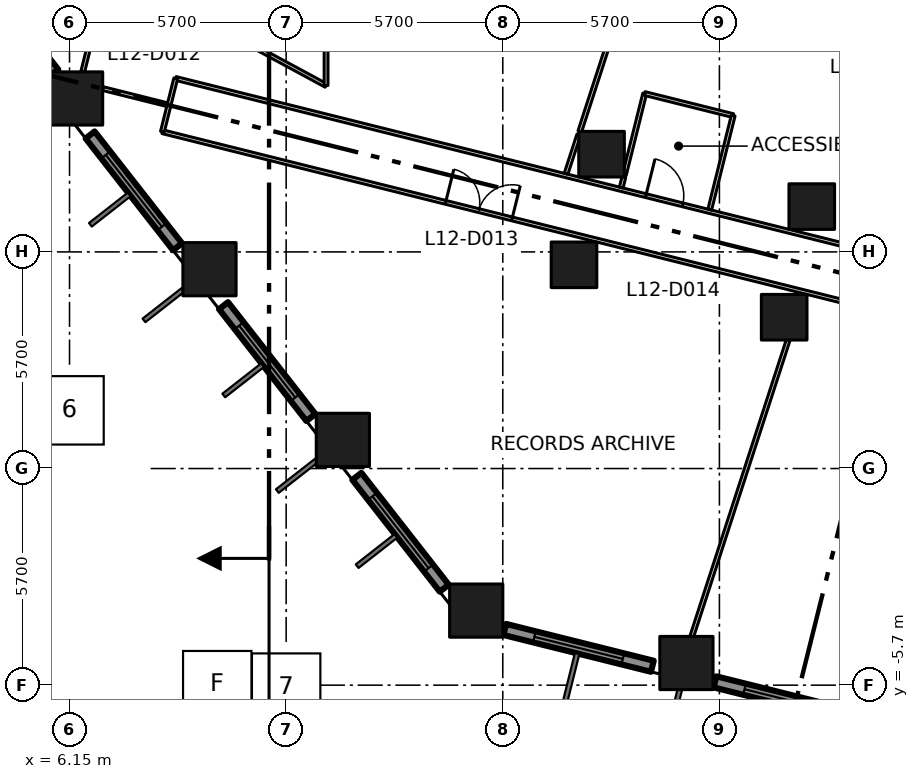
"""IFC4 building model, lengths in metres.
Left out: names, types, materials, properties, quantities, classifications, styles, units other than length and angle.
Written with IfcOpenShell. Run it as: python <this file> out.ifc"""

import sys

from ifc_helpers import new_model, si_unit, direction, frame, frame_2d, origin, origin_2d, place, context, subcontext, project, spatial, rectangle, extrude, element, fill, save


model = new_model("IFC4")
c1 = context("Model", 3, precision=1e-05, world=origin(), true_north=direction((0.0, 1.0)))
c2 = subcontext(c1, "Body", "Model", "MODEL_VIEW")
j1 = project(units=[si_unit("LENGTHUNIT", "METRE"), si_unit("PLANEANGLEUNIT", "RADIAN")], contexts=[c1])
p1 = place(None, origin())
s1 = spatial("IfcSite", under=j1, at=p1, CompositionType="ELEMENT")
p2 = place(p1, origin())
s2 = spatial("IfcBuilding", under=s1, at=p2, CompositionType="ELEMENT")
p3 = place(p2, frame((0.0, 0.0, 58.2)))
s3 = spatial("IfcBuildingStorey", under=s2, at=p3, CompositionType="ELEMENT", Elevation=58.2)
for number, where, z_axis, x_axis in (
    (1, (16.851, -3.738, 0.0), (0.0, 0.0, 1.0), (1.0, 0.0, 0.0)),
    (2, (13.342, 0.754, 0.0), (0.0, 0.0, 1.0), (1.0, 0.0, 0.0)),
    (3, (9.833, 5.245, 0.0), (0.0, 0.0, 1.0), (1.0, 0.0, 0.0)),
    (4, (6.323, 9.737, 0.0), (0.0, 0.0, 1.0), (1.0, 0.0, 0.0)),
    (5, (22.382, -5.117, 0.0), (0.0, 0.0, 1.0), (1.0, 0.0, 0.0)),
):
    element("IfcColumn", number, at=place(p3, frame(where, z_axis=z_axis, x_axis=x_axis)), inside=s3, PredefinedType="COLUMN", context=c2, shape_type="SweptSolid", body=[
        extrude(rectangle(XDim=1.4, YDim=1.4, at=origin_2d()), origin(), (0.0, 0.0, 1.0), 4.2),
    ])
for number, where, z_axis, x_axis in (
    (6, (19.424, 5.36, 0.0), (0.0, 0.0, 1.0), (1.0, 0.0, 0.0)),
    (7, (24.954, 3.981, 0.0), (0.0, 0.0, 1.0), (1.0, 0.0, 0.0)),
    (8, (20.149, 8.271, 0.0), (0.0, 0.0, 1.0), (1.0, 0.0, 0.0)),
    (9, (25.68, 6.892, 0.0), (0.0, 0.0, 1.0), (1.0, 0.0, 0.0)),
):
    element("IfcColumn", number, at=place(p3, frame(where, z_axis=z_axis, x_axis=x_axis)), inside=s3, PredefinedType="COLUMN", context=c2, shape_type="SweptSolid", body=[
        extrude(rectangle(XDim=1.2, YDim=1.2, at=origin_2d()), origin(), (0.0, 0.0, 1.0), 4.2),
    ])
p4 = place(p3, frame((3.361, 13.529, 0.0), z_axis=(0.0, 0.0, 1.0), x_axis=(0.615507574125, -0.788130970204, 0.0)))
e10 = element("IfcWall", 10, at=p4, inside=s3, PredefinedType="SOLIDWALL", context=c2, shape_type="SweptSolid", body=[
    extrude(rectangle(XDim=3.923, YDim=0.2, at=frame_2d((1.962, 0.0))), origin(), (0.0, 0.0, 1.0), 3.1),
])
p5 = place(p4, frame((1.061, 0.0, 0.0)))
e11 = element("IfcOpeningElement", 11, at=p5, cuts=e10, PredefinedType="OPENING", context=c2, shape_type="SweptSolid", body=[
    extrude(rectangle(XDim=1.8, YDim=2.9, at=frame_2d((0.9, 1.45))), frame((0.0, 0.11, 0.0), z_axis=(0.0, -1.0, 0.0), x_axis=(1.0, 0.0, 0.0)), (0.0, 0.0, 1.0), 0.22),
])
p6 = place(p3, frame((6.692, 8.778, 0.0), z_axis=(0.0, 0.0, 1.0), x_axis=(0.615767067156, -0.787928244833, 0.0)))
e12 = element("IfcWall", 12, at=p6, inside=s3, PredefinedType="SOLIDWALL", context=c2, shape_type="SweptSolid", body=[
    extrude(rectangle(XDim=3.735, YDim=0.3, at=frame_2d((1.868, 0.0))), origin(), (0.0, 0.0, 1.0), 3.1),
])
p7 = place(p6, frame((0.668, 0.0, 0.8)))
e13 = element("IfcOpeningElement", 13, at=p7, cuts=e12, PredefinedType="OPENING", context=c2, shape_type="SweptSolid", body=[
    extrude(rectangle(XDim=2.4, YDim=2.1, at=frame_2d((1.2, 1.05))), frame((0.0, 0.16, 0.0), z_axis=(0.0, -1.0, 0.0), x_axis=(1.0, 0.0, 0.0)), (0.0, 0.0, 1.0), 0.32),
])
p8 = place(p3, frame((10.202, 4.286, 0.0), z_axis=(0.0, 0.0, 1.0), x_axis=(0.615636430057, -0.788030320474, 0.0)))
e14 = element("IfcWall", 14, at=p8, inside=s3, PredefinedType="SOLIDWALL", context=c2, shape_type="SweptSolid", body=[
    extrude(rectangle(XDim=3.734, YDim=0.3, at=frame_2d((1.867, 0.0))), origin(), (0.0, 0.0, 1.0), 3.1),
])
p9 = place(p8, frame((0.667, 0.0, 0.8)))
e15 = element("IfcOpeningElement", 15, at=p9, cuts=e14, PredefinedType="OPENING", context=c2, shape_type="SweptSolid", body=[
    extrude(rectangle(XDim=2.4, YDim=2.1, at=frame_2d((1.2, 1.05))), frame((0.0, 0.16, 0.0), z_axis=(0.0, -1.0, 0.0), x_axis=(1.0, 0.0, 0.0)), (0.0, 0.0, 1.0), 0.32),
])
p10 = place(p3, frame((13.71, -0.205, 0.0), z_axis=(0.0, 0.0, 1.0), x_axis=(0.615798780214, -0.787903460004, 0.0)))
e16 = element("IfcWall", 16, at=p10, inside=s3, PredefinedType="SOLIDWALL", context=c2, shape_type="SweptSolid", body=[
    extrude(rectangle(XDim=3.735, YDim=0.3, at=frame_2d((1.868, 0.0))), origin(), (0.0, 0.0, 1.0), 3.1),
])
p11 = place(p10, frame((0.667, 0.0, 0.8)))
e17 = element("IfcOpeningElement", 17, at=p11, cuts=e16, PredefinedType="OPENING", context=c2, shape_type="SweptSolid", body=[
    extrude(rectangle(XDim=2.4, YDim=2.1, at=frame_2d((1.2, 1.05))), frame((0.0, 0.16, 0.0), z_axis=(0.0, -1.0, 0.0), x_axis=(1.0, 0.0, 0.0)), (0.0, 0.0, 1.0), 0.32),
])
p12 = place(p3, frame((17.602, -4.234, 0.0), z_axis=(0.0, 0.0, 1.0), x_axis=(0.970260773365, -0.242062040951, 0.0)))
e18 = element("IfcWall", 18, at=p12, inside=s3, PredefinedType="SOLIDWALL", context=c2, shape_type="SweptSolid", body=[
    extrude(rectangle(XDim=4.003, YDim=0.3, at=frame_2d((2.001, 0.0))), origin(), (0.0, 0.0, 1.0), 3.1),
])
p13 = place(p12, frame((0.802, 0.0, 0.8)))
e19 = element("IfcOpeningElement", 19, at=p13, cuts=e18, PredefinedType="OPENING", context=c2, shape_type="SweptSolid", body=[
    extrude(rectangle(XDim=2.4, YDim=2.1, at=frame_2d((1.2, 1.05))), frame((0.0, 0.16, 0.0), z_axis=(0.0, -1.0, 0.0), x_axis=(1.0, 0.0, 0.0)), (0.0, 0.0, 1.0), 0.32),
])
p14 = place(p3, frame((23.133, -5.613, 0.0), z_axis=(0.0, 0.0, 1.0), x_axis=(0.970303772127, -0.241889623168, 0.0)))
e20 = element("IfcWall", 20, at=p14, inside=s3, PredefinedType="SOLIDWALL", context=c2, shape_type="SweptSolid", body=[
    extrude(rectangle(XDim=4.002, YDim=0.3, at=frame_2d((2.001, 0.0))), origin(), (0.0, 0.0, 1.0), 3.1),
])
p15 = place(p14, frame((0.801, 0.0, 0.8)))
e21 = element("IfcOpeningElement", 21, at=p15, cuts=e20, PredefinedType="OPENING", context=c2, shape_type="SweptSolid", body=[
    extrude(rectangle(XDim=2.4, YDim=2.1, at=frame_2d((1.2, 1.05))), frame((0.0, 0.16, 0.0), z_axis=(0.0, -1.0, 0.0), x_axis=(1.0, 0.0, 0.0)), (0.0, 0.0, 1.0), 0.32),
])
p16 = place(p3, frame((8.594, 8.862, 0.0), z_axis=(0.0, 0.0, 1.0), x_axis=(0.970293392615, -0.241931255211, 0.0)))
e22 = element("IfcWall", 22, at=p16, inside=s3, PredefinedType="PARTITIONING", context=c2, shape_type="SweptSolid", body=[
    extrude(rectangle(XDim=67.775, YDim=0.1, at=frame_2d((33.888, 0.0))), origin(), (0.0, 0.0, 1.0), 3.9),
])
p17 = place(p16, frame((41.271, 0.0, 0.0)))
e23 = element("IfcOpeningElement", 23, at=p17, cuts=e22, PredefinedType="OPENING", context=c2, shape_type="SweptSolid", body=[
    extrude(rectangle(XDim=1.8, YDim=2.1, at=frame_2d((0.9, 1.05))), frame((0.0, 0.06, 0.0), z_axis=(0.0, -1.0, 0.0), x_axis=(1.0, 0.0, 0.0)), (0.0, 0.0, 1.0), 0.12),
])
p18 = place(p16, frame((48.571, 0.0, 0.0)))
e24 = element("IfcOpeningElement", 24, at=p18, cuts=e22, PredefinedType="OPENING", context=c2, shape_type="SweptSolid", body=[
    extrude(rectangle(XDim=1.0, YDim=2.1, at=frame_2d((0.5, 1.05))), frame((0.0, 0.06, 0.0), z_axis=(0.0, -1.0, 0.0), x_axis=(1.0, 0.0, 0.0)), (0.0, 0.0, 1.0), 0.12),
])
p19 = place(p16, frame((59.471, 0.0, 0.0)))
e25 = element("IfcOpeningElement", 25, at=p19, cuts=e22, PredefinedType="OPENING", context=c2, shape_type="SweptSolid", body=[
    extrude(rectangle(XDim=1.0, YDim=2.1, at=frame_2d((0.5, 1.05))), frame((0.0, 0.06, 0.0), z_axis=(0.0, -1.0, 0.0), x_axis=(1.0, 0.0, 0.0)), (0.0, 0.0, 1.0), 0.12),
])
p20 = place(p16, frame((20.171, 0.0, 0.0)))
e26 = element("IfcOpeningElement", 26, at=p20, cuts=e22, PredefinedType="OPENING", context=c2, shape_type="SweptSolid", body=[
    extrude(rectangle(XDim=1.0, YDim=2.1, at=frame_2d((0.5, 1.05))), frame((0.0, 0.06, 0.0), z_axis=(0.0, -1.0, 0.0), x_axis=(1.0, 0.0, 0.0)), (0.0, 0.0, 1.0), 0.12),
])
p21 = place(p16, frame((25.271, 0.0, 0.0)))
e27 = element("IfcOpeningElement", 27, at=p21, cuts=e22, PredefinedType="OPENING", context=c2, shape_type="SweptSolid", body=[
    extrude(rectangle(XDim=1.8, YDim=2.1, at=frame_2d((0.9, 1.05))), frame((0.0, 0.06, 0.0), z_axis=(0.0, -1.0, 0.0), x_axis=(1.0, 0.0, 0.0)), (0.0, 0.0, 1.0), 0.12),
])
p22 = place(p16, frame((7.68, 0.0, 0.0)))
e28 = element("IfcOpeningElement", 28, at=p22, cuts=e22, PredefinedType="OPENING", context=c2, shape_type="SweptSolid", body=[
    extrude(rectangle(XDim=1.8, YDim=2.1, at=frame_2d((0.9, 1.05))), frame((0.0, 0.06, 0.0), z_axis=(0.0, -1.0, 0.0), x_axis=(1.0, 0.0, 0.0)), (0.0, 0.0, 1.0), 0.12),
])
p23 = place(p3, frame((8.944, 10.264, 0.0), z_axis=(0.0, 0.0, 1.0), x_axis=(0.970300504447, -0.241902730595, 0.0)))
e29 = element("IfcWall", 29, at=p23, inside=s3, PredefinedType="PARTITIONING", context=c2, shape_type="SweptSolid", body=[
    extrude(rectangle(XDim=19.879, YDim=0.1, at=frame_2d((9.939, 0.0))), origin(), (0.0, 0.0, 1.0), 3.9),
])
p24 = place(p23, frame((12.749, 0.0, 0.0)))
e30 = element("IfcOpeningElement", 30, at=p24, cuts=e29, PredefinedType="OPENING", context=c2, shape_type="SweptSolid", body=[
    extrude(rectangle(XDim=1.0, YDim=2.1, at=frame_2d((0.5, 1.05))), frame((0.0, 0.06, 0.0), z_axis=(0.0, -1.0, 0.0), x_axis=(1.0, 0.0, 0.0)), (0.0, 0.0, 1.0), 0.12),
])
p25 = place(p3, frame((8.944, 10.264, 0.0), z_axis=(0.0, 0.0, 1.0), x_axis=(-0.242297077633, -0.970202105837, 0.0)))
e31 = element("IfcWall", 31, at=p25, inside=s3, PredefinedType="PARTITIONING", context=c2, shape_type="SweptSolid", body=[
    extrude(rectangle(XDim=1.445, YDim=0.1, at=frame_2d((0.722, 0.0))), origin(), (0.0, 0.0, 1.0), 3.9),
])
p26 = place(p3, frame((9.9, 11.7, 0.0), z_axis=(0.0, 0.0, 1.0), x_axis=(0.87965147249, -0.475618846291, 0.0)))
e32 = element("IfcWall", 32, at=p26, inside=s3, PredefinedType="PARTITIONING", context=c2, shape_type="SweptSolid", body=[
    extrude(rectangle(XDim=3.41, YDim=0.1, at=frame_2d((1.705, 0.0))), origin(), (0.0, 0.0, 1.0), 3.9),
])
p27 = place(p3, frame((12.9, 10.078, 0.0), z_axis=(0.0, 0.0, 1.0), x_axis=(0.0, 1.0, 0.0)))
e33 = element("IfcWall", 33, at=p27, inside=s3, PredefinedType="PARTITIONING", context=c2, shape_type="SweptSolid", body=[
    extrude(rectangle(XDim=4.022, YDim=0.1, at=frame_2d((2.011, 0.0))), origin(), (0.0, 0.0, 1.0), 3.9),
])
p28 = place(p3, frame((6.797, 11.638, 0.0), z_axis=(0.0, 0.0, 1.0), x_axis=(-0.242396400943, -0.970177295555, 0.0)))
e34 = element("IfcWall", 34, at=p28, inside=s3, PredefinedType="PARTITIONING", context=c2, shape_type="SweptSolid", body=[
    extrude(rectangle(XDim=1.238, YDim=0.1, at=frame_2d((0.619, 0.0))), origin(), (0.0, 0.0, 1.0), 3.9),
])
p29 = place(p3, frame((8.72, 9.574, 0.0), z_axis=(0.0, 0.0, 1.0), x_axis=(-0.97016712555, 0.242437102155, 0.0)))
e35 = element("IfcWall", 35, at=p29, inside=s3, PredefinedType="PARTITIONING", context=c2, shape_type="SweptSolid", body=[
    extrude(rectangle(XDim=1.749, YDim=0.1, at=frame_2d((0.875, 0.0))), origin(), (0.0, 0.0, 1.0), 3.9),
])
p30 = place(p3, frame((19.216, 7.758, 0.0), z_axis=(0.0, 0.0, 1.0), x_axis=(0.308748247722, 0.9511437954, 0.0)))
e36 = element("IfcWall", 36, at=p30, inside=s3, PredefinedType="PARTITIONING", context=c2, shape_type="SweptSolid", body=[
    extrude(rectangle(XDim=1.079, YDim=0.1, at=frame_2d((0.539, 0.0))), origin(), (0.0, 0.0, 1.0), 3.9),
])
p31 = place(p3, frame((19.577, 8.871, 0.0), z_axis=(0.0, 0.0, 1.0), x_axis=(0.309011770838, 0.951058213509, 0.0)))
e37 = element("IfcWall", 37, at=p31, inside=s3, PredefinedType="PARTITIONING", context=c2, shape_type="SweptSolid", body=[
    extrude(rectangle(XDim=5.498, YDim=0.1, at=frame_2d((2.749, 0.0))), origin(), (0.0, 0.0, 1.0), 3.9),
])
p32 = place(p3, frame((20.667, 7.393, 0.0), z_axis=(0.0, 0.0, 1.0), x_axis=(0.241331539526, 0.970442727846, 0.0)))
e38 = element("IfcWall", 38, at=p32, inside=s3, PredefinedType="PARTITIONING", context=c2, shape_type="SweptSolid", body=[
    extrude(rectangle(XDim=0.286, YDim=0.1, at=frame_2d((0.143, 0.0))), origin(), (0.0, 0.0, 1.0), 3.9),
])
p33 = place(p3, frame((20.749, 7.722, 0.0), z_axis=(0.0, 0.0, 1.0), x_axis=(0.241963917433, 0.97028524809, 0.0)))
e39 = element("IfcWall", 39, at=p33, inside=s3, PredefinedType="PARTITIONING", context=c2, shape_type="SweptSolid", body=[
    extrude(rectangle(XDim=2.211, YDim=0.1, at=frame_2d((1.105, 0.0))), origin(), (0.0, 0.0, 1.0), 3.9),
])
p34 = place(p3, frame((21.284, 9.867, 0.0), z_axis=(0.0, 0.0, 1.0), x_axis=(0.970262034576, -0.242056985565, 0.0)))
e40 = element("IfcWall", 40, at=p34, inside=s3, PredefinedType="PARTITIONING", context=c2, shape_type="SweptSolid", body=[
    extrude(rectangle(XDim=2.4, YDim=0.1, at=frame_2d((1.2, 0.0))), origin(), (0.0, 0.0, 1.0), 3.9),
])
p35 = place(p3, frame((22.524, -4.417, 0.0), z_axis=(0.0, 0.0, 1.0), x_axis=(0.309171572002, 0.951006277091, 0.0)))
e41 = element("IfcWall", 41, at=p35, inside=s3, PredefinedType="PARTITIONING", context=c2, shape_type="SweptSolid", body=[
    extrude(rectangle(XDim=8.2, YDim=0.1, at=frame_2d((4.1, 0.0))), origin(), (0.0, 0.0, 1.0), 3.9),
])
p36 = place(p3, frame((23.613, 9.286, 0.0), z_axis=(0.0, 0.0, 1.0), x_axis=(-0.241972320765, -0.970283152478, 0.0)))
e42 = element("IfcWall", 42, at=p36, inside=s3, PredefinedType="PARTITIONING", context=c2, shape_type="SweptSolid", body=[
    extrude(rectangle(XDim=2.55, YDim=0.1, at=frame_2d((1.275, 0.0))), origin(), (0.0, 0.0, 1.0), 3.9),
])
p37 = place(p7, origin())
e43 = element("IfcWindow", 43, at=p37, inside=s3, PartitioningType="DOUBLE_PANEL_VERTICAL", PredefinedType="WINDOW", context=c2, shape_type="SweptSolid", body=[
    extrude(rectangle(XDim=2.4, YDim=2.1, at=frame_2d((1.2, 1.05))), frame((0.0, 0.03, 0.0), z_axis=(0.0, -1.0, 0.0), x_axis=(1.0, 0.0, 0.0)), (0.0, 0.0, 1.0), 0.06),
])
fill(e13, e43)
p38 = place(p9, origin())
e44 = element("IfcWindow", 44, at=p38, inside=s3, PartitioningType="DOUBLE_PANEL_VERTICAL", PredefinedType="WINDOW", context=c2, shape_type="SweptSolid", body=[
    extrude(rectangle(XDim=2.4, YDim=2.1, at=frame_2d((1.2, 1.05))), frame((0.0, 0.03, 0.0), z_axis=(0.0, -1.0, 0.0), x_axis=(1.0, 0.0, 0.0)), (0.0, 0.0, 1.0), 0.06),
])
fill(e15, e44)
p39 = place(p11, origin())
e45 = element("IfcWindow", 45, at=p39, inside=s3, PartitioningType="DOUBLE_PANEL_VERTICAL", PredefinedType="WINDOW", context=c2, shape_type="SweptSolid", body=[
    extrude(rectangle(XDim=2.4, YDim=2.1, at=frame_2d((1.2, 1.05))), frame((0.0, 0.03, 0.0), z_axis=(0.0, -1.0, 0.0), x_axis=(1.0, 0.0, 0.0)), (0.0, 0.0, 1.0), 0.06),
])
fill(e17, e45)
p40 = place(p13, origin())
e46 = element("IfcWindow", 46, at=p40, inside=s3, PartitioningType="DOUBLE_PANEL_VERTICAL", PredefinedType="WINDOW", context=c2, shape_type="SweptSolid", body=[
    extrude(rectangle(XDim=2.4, YDim=2.1, at=frame_2d((1.2, 1.05))), frame((0.0, 0.03, 0.0), z_axis=(0.0, -1.0, 0.0), x_axis=(1.0, 0.0, 0.0)), (0.0, 0.0, 1.0), 0.06),
])
fill(e19, e46)
p41 = place(p15, origin())
e47 = element("IfcWindow", 47, at=p41, inside=s3, PartitioningType="DOUBLE_PANEL_VERTICAL", PredefinedType="WINDOW", context=c2, shape_type="SweptSolid", body=[
    extrude(rectangle(XDim=2.4, YDim=2.1, at=frame_2d((1.2, 1.05))), frame((0.0, 0.03, 0.0), z_axis=(0.0, -1.0, 0.0), x_axis=(1.0, 0.0, 0.0)), (0.0, 0.0, 1.0), 0.06),
])
fill(e21, e47)
p42 = place(p22, origin())
e48 = element("IfcDoor", 48, at=p42, inside=s3, OperationType="DOUBLE_DOOR_SINGLE_SWING", PredefinedType="DOOR", context=c2, shape_type="SweptSolid", body=[
    extrude(rectangle(XDim=1.8, YDim=2.1, at=frame_2d((0.9, 1.05))), frame((0.0, 0.025, 0.0), z_axis=(0.0, -1.0, 0.0), x_axis=(1.0, 0.0, 0.0)), (0.0, 0.0, 1.0), 0.05),
])
fill(e28, e48)
p43 = place(p24, origin())
e49 = element("IfcDoor", 49, at=p43, inside=s3, OperationType="SINGLE_SWING_LEFT", PredefinedType="DOOR", context=c2, shape_type="SweptSolid", body=[
    extrude(rectangle(XDim=1.0, YDim=2.1, at=frame_2d((0.5, 1.05))), frame((0.0, 0.025, 0.0), z_axis=(0.0, -1.0, 0.0), x_axis=(1.0, 0.0, 0.0)), (0.0, 0.0, 1.0), 0.05),
])
fill(e30, e49)
save(model, sys.argv[1])
